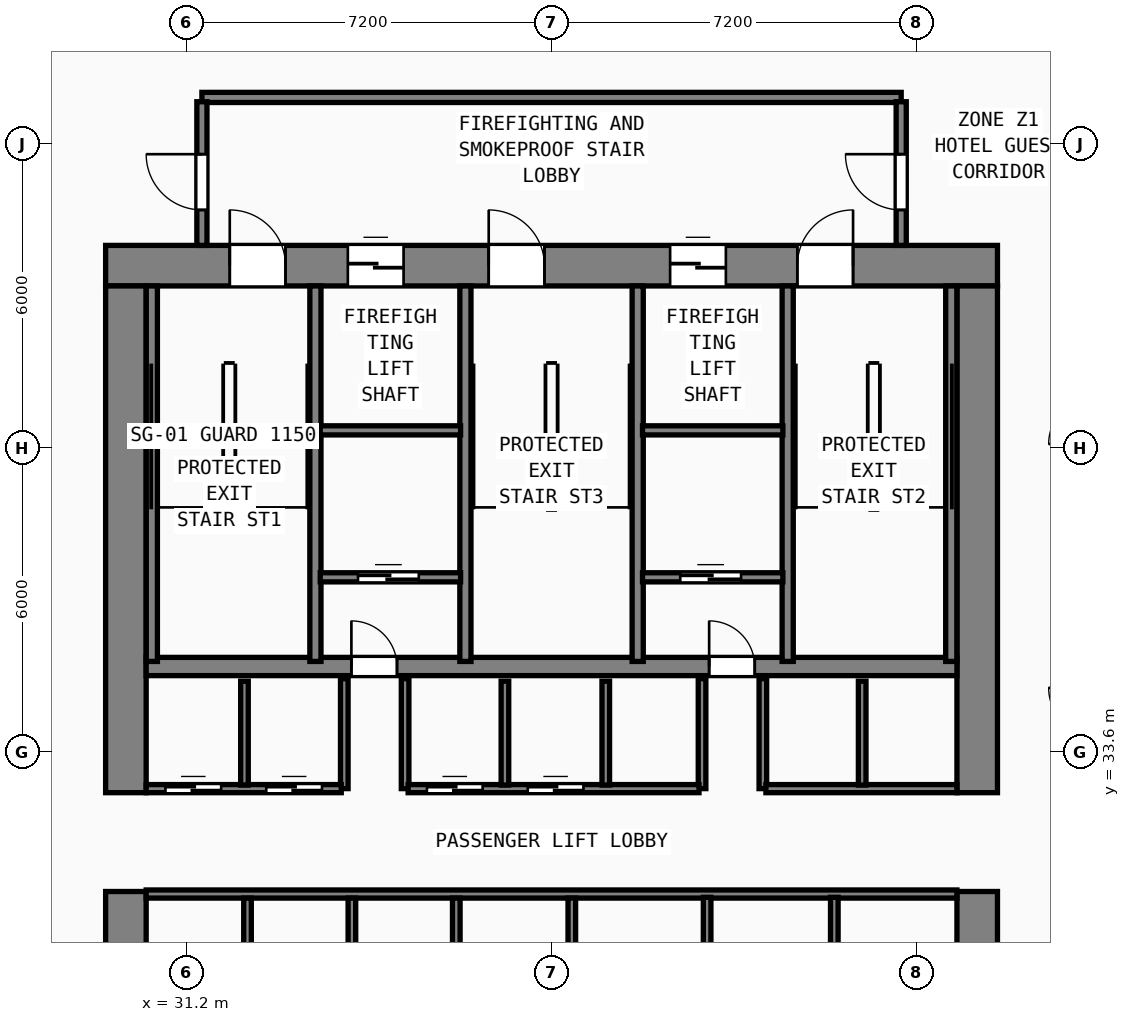
"""IFC4 building model, lengths in metres.
Left out: names, types, materials, properties, quantities, classifications, styles, units other than length and angle.
Written with IfcOpenShell. Run it as: python <this file> out.ifc"""

import sys

from ifc_helpers import new_model, si_unit, direction, frame, frame_2d, origin, place, context, subcontext, project, spatial, rectangle, extrude, element, fill, save


model = new_model("IFC4")
c1 = context("Model", 3, precision=1e-05, world=origin(), true_north=direction((0.0, 1.0)))
c2 = subcontext(c1, "Body", "Model", "MODEL_VIEW")
j1 = project(units=[si_unit("LENGTHUNIT", "METRE"), si_unit("PLANEANGLEUNIT", "RADIAN")], contexts=[c1])
p1 = place(None, origin())
s1 = spatial("IfcSite", under=j1, at=p1, CompositionType="ELEMENT")
p2 = place(p1, origin())
s2 = spatial("IfcBuilding", under=s1, at=p2, CompositionType="ELEMENT")
p3 = place(p2, frame((0.0, 0.0, 24.0)))
s3 = spatial("IfcBuildingStorey", under=s2, at=p3, CompositionType="ELEMENT", Elevation=24.0)
p4 = place(p3, frame((29.6, 43.2, 0.0), z_axis=(0.0, 0.0, 1.0), x_axis=(1.0, 0.0, 0.0)))
e1 = element("IfcWall", 1, at=p4, inside=s3, PredefinedType="SHEAR", context=c2, shape_type="SweptSolid", body=[
    extrude(rectangle(XDim=17.6, YDim=0.8, at=frame_2d((8.8, 0.0))), origin(), (0.0, 0.0, 1.0), 3.6),
])
p5 = place(p4, frame((2.45, 0.0, 0.0)))
e2 = element("IfcOpeningElement", 2, at=p5, cuts=e1, PredefinedType="OPENING", context=c2, shape_type="SweptSolid", body=[
    extrude(rectangle(XDim=1.1, YDim=2.15, at=frame_2d((0.55, 1.075))), frame((0.0, 0.41, 0.0), z_axis=(0.0, -1.0, 0.0), x_axis=(1.0, 0.0, 0.0)), (0.0, 0.0, 1.0), 0.82),
])
p6 = place(p4, frame((7.56, 0.0, 0.0)))
e3 = element("IfcOpeningElement", 3, at=p6, cuts=e1, PredefinedType="OPENING", context=c2, shape_type="SweptSolid", body=[
    extrude(rectangle(XDim=1.1, YDim=2.15, at=frame_2d((0.55, 1.075))), frame((0.0, 0.41, 0.0), z_axis=(0.0, -1.0, 0.0), x_axis=(1.0, 0.0, 0.0)), (0.0, 0.0, 1.0), 0.82),
])
p7 = place(p4, frame((13.65, 0.0, 0.0)))
e4 = element("IfcOpeningElement", 4, at=p7, cuts=e1, PredefinedType="OPENING", context=c2, shape_type="SweptSolid", body=[
    extrude(rectangle(XDim=1.1, YDim=2.15, at=frame_2d((0.55, 1.075))), frame((0.0, 0.41, 0.0), z_axis=(0.0, -1.0, 0.0), x_axis=(1.0, 0.0, 0.0)), (0.0, 0.0, 1.0), 0.82),
])
p8 = place(p4, frame((4.78, 0.0, 0.0)))
e5 = element("IfcOpeningElement", 5, at=p8, cuts=e1, PredefinedType="OPENING", context=c2, shape_type="SweptSolid", body=[
    extrude(rectangle(XDim=1.1, YDim=2.2, at=frame_2d((0.55, 1.1))), frame((0.0, 0.41, 0.0), z_axis=(0.0, -1.0, 0.0), x_axis=(1.0, 0.0, 0.0)), (0.0, 0.0, 1.0), 0.82),
])
p9 = place(p4, frame((11.14, 0.0, 0.0)))
e6 = element("IfcOpeningElement", 6, at=p9, cuts=e1, PredefinedType="OPENING", context=c2, shape_type="SweptSolid", body=[
    extrude(rectangle(XDim=1.1, YDim=2.2, at=frame_2d((0.55, 1.1))), frame((0.0, 0.41, 0.0), z_axis=(0.0, -1.0, 0.0), x_axis=(1.0, 0.0, 0.0)), (0.0, 0.0, 1.0), 0.82),
])
p10 = place(p3, frame((30.0, 26.8, 0.0), z_axis=(0.0, 0.0, 1.0), x_axis=(0.0, 1.0, 0.0)))
e7 = element("IfcWall", 7, at=p10, inside=s3, PredefinedType="SHEAR", context=c2, shape_type="SweptSolid", body=[
    extrude(rectangle(XDim=4.05, YDim=0.8, at=frame_2d((2.025, 0.0))), origin(), (0.0, 0.0, 1.0), 3.6),
])
p11 = place(p3, frame((30.0, 32.8, 0.0), z_axis=(0.0, 0.0, 1.0), x_axis=(0.0, 1.0, 0.0)))
e8 = element("IfcWall", 8, at=p11, inside=s3, PredefinedType="SHEAR", context=c2, shape_type="SweptSolid", body=[
    extrude(rectangle(XDim=10.0, YDim=0.8, at=frame_2d((5.0, 0.0))), origin(), (0.0, 0.0, 1.0), 3.6),
])
p12 = place(p3, frame((46.8, 26.8, 0.0), z_axis=(0.0, 0.0, 1.0), x_axis=(0.0, 1.0, 0.0)))
e9 = element("IfcWall", 9, at=p12, inside=s3, PredefinedType="SHEAR", context=c2, shape_type="SweptSolid", body=[
    extrude(rectangle(XDim=4.05, YDim=0.8, at=frame_2d((2.025, 0.0))), origin(), (0.0, 0.0, 1.0), 3.6),
])
p13 = place(p3, frame((46.8, 32.8, 0.0), z_axis=(0.0, 0.0, 1.0), x_axis=(0.0, 1.0, 0.0)))
e10 = element("IfcWall", 10, at=p13, inside=s3, PredefinedType="SHEAR", context=c2, shape_type="SweptSolid", body=[
    extrude(rectangle(XDim=10.0, YDim=0.8, at=frame_2d((5.0, 0.0))), origin(), (0.0, 0.0, 1.0), 3.6),
])
p14 = place(p3, frame((30.4, 35.29, 0.0), z_axis=(0.0, 0.0, 1.0), x_axis=(1.0, 0.0, 0.0)))
e11 = element("IfcWall", 11, at=p14, inside=s3, PredefinedType="SHEAR", context=c2, shape_type="SweptSolid", body=[
    extrude(rectangle(XDim=16.0, YDim=0.36, at=frame_2d((8.0, 0.0))), origin(), (0.0, 0.0, 1.0), 3.6),
])
p15 = place(p14, frame((4.95, 0.0, 0.0), z_axis=(0.0, 0.0, 1.0), x_axis=(-1.0, 0.0, 0.0)))
e12 = element("IfcOpeningElement", 12, at=p15, cuts=e11, PredefinedType="OPENING", context=c2, shape_type="SweptSolid", body=[
    extrude(rectangle(XDim=0.9, YDim=2.1, at=frame_2d((0.45, 1.05))), frame((0.0, 0.19, 0.0), z_axis=(0.0, -1.0, 0.0), x_axis=(1.0, 0.0, 0.0)), (0.0, 0.0, 1.0), 0.38),
])
p16 = place(p14, frame((12.01, 0.0, 0.0), z_axis=(0.0, 0.0, 1.0), x_axis=(-1.0, 0.0, 0.0)))
e13 = element("IfcOpeningElement", 13, at=p16, cuts=e11, PredefinedType="OPENING", context=c2, shape_type="SweptSolid", body=[
    extrude(rectangle(XDim=0.9, YDim=2.1, at=frame_2d((0.45, 1.05))), frame((0.0, 0.19, 0.0), z_axis=(0.0, -1.0, 0.0), x_axis=(1.0, 0.0, 0.0)), (0.0, 0.0, 1.0), 0.38),
])
for number, where, z_axis, x_axis in (
    (14, (30.512, 35.39, 0.0), (0.0, 0.0, 1.0), (0.0, 1.0, 0.0)),
    (15, (33.74, 35.39, 0.0), (0.0, 0.0, 1.0), (0.0, 1.0, 0.0)),
    (16, (36.7, 35.39, 0.0), (0.0, 0.0, 1.0), (0.0, 1.0, 0.0)),
    (17, (40.1, 35.39, 0.0), (0.0, 0.0, 1.0), (0.0, 1.0, 0.0)),
    (18, (43.06, 35.39, 0.0), (0.0, 0.0, 1.0), (0.0, 1.0, 0.0)),
    (19, (46.288, 35.39, 0.0), (0.0, 0.0, 1.0), (0.0, 1.0, 0.0)),
):
    element("IfcWall", number, at=place(p3, frame(where, z_axis=z_axis, x_axis=x_axis)), inside=s3, PredefinedType="SHEAR", context=c2, shape_type="SweptSolid", body=[
        extrude(rectangle(XDim=7.41, YDim=0.22, at=frame_2d((3.705, 0.0))), origin(), (0.0, 0.0, 1.0), 3.6),
    ])
p17 = place(p3, frame((31.5, 46.52, 0.0), z_axis=(0.0, 0.0, 1.0), x_axis=(1.0, 0.0, 0.0)))
e20 = element("IfcWall", 20, at=p17, inside=s3, PredefinedType="SOLIDWALL", context=c2, shape_type="SweptSolid", body=[
    extrude(rectangle(XDim=13.8, YDim=0.2, at=frame_2d((6.9, 0.0))), origin(), (0.0, 0.0, 1.0), 3.6),
])
p18 = place(p3, frame((31.5, 43.6, 0.0), z_axis=(0.0, 0.0, 1.0), x_axis=(0.0, 1.0, 0.0)))
e21 = element("IfcWall", 21, at=p18, inside=s3, PredefinedType="SOLIDWALL", context=c2, shape_type="SweptSolid", body=[
    extrude(rectangle(XDim=2.835, YDim=0.2, at=frame_2d((1.417, 0.0))), origin(), (0.0, 0.0, 1.0), 3.6),
])
p19 = place(p18, frame((1.8, 0.0, 0.0), z_axis=(0.0, 0.0, 1.0), x_axis=(-1.0, 0.0, 0.0)))
e22 = element("IfcOpeningElement", 22, at=p19, cuts=e21, PredefinedType="OPENING", context=c2, shape_type="SweptSolid", body=[
    extrude(rectangle(XDim=1.1, YDim=2.15, at=frame_2d((0.55, 1.075))), frame((0.0, 0.11, 0.0), z_axis=(0.0, -1.0, 0.0), x_axis=(1.0, 0.0, 0.0)), (0.0, 0.0, 1.0), 0.22),
])
p20 = place(p3, frame((45.3, 43.6, 0.0), z_axis=(0.0, 0.0, 1.0), x_axis=(0.0, 1.0, 0.0)))
e23 = element("IfcWall", 23, at=p20, inside=s3, PredefinedType="SOLIDWALL", context=c2, shape_type="SweptSolid", body=[
    extrude(rectangle(XDim=2.835, YDim=0.2, at=frame_2d((1.417, 0.0))), origin(), (0.0, 0.0, 1.0), 3.6),
])
p21 = place(p20, frame((0.7, 0.0, 0.0)))
e24 = element("IfcOpeningElement", 24, at=p21, cuts=e23, PredefinedType="OPENING", context=c2, shape_type="SweptSolid", body=[
    extrude(rectangle(XDim=1.1, YDim=2.15, at=frame_2d((0.55, 1.075))), frame((0.0, 0.11, 0.0), z_axis=(0.0, -1.0, 0.0), x_axis=(1.0, 0.0, 0.0)), (0.0, 0.0, 1.0), 0.22),
])
for number, where, z_axis, x_axis in (
    (25, (33.835, 39.95, 0.0), (0.0, 0.0, 1.0), (1.0, 0.0, 0.0)),
    (26, (40.195, 39.95, 0.0), (0.0, 0.0, 1.0), (1.0, 0.0, 0.0)),
):
    element("IfcWall", number, at=place(p3, frame(where, z_axis=z_axis, x_axis=x_axis)), inside=s3, PredefinedType="SOLIDWALL", context=c2, shape_type="SweptSolid", body=[
        extrude(rectangle(XDim=2.77, YDim=0.18, at=frame_2d((1.385, 0.0))), origin(), (0.0, 0.0, 1.0), 3.6),
    ])
p22 = place(p3, frame((33.835, 37.05, 0.0), z_axis=(0.0, 0.0, 1.0), x_axis=(1.0, 0.0, 0.0)))
e27 = element("IfcWall", 27, at=p22, inside=s3, PredefinedType="SOLIDWALL", context=c2, shape_type="SweptSolid", body=[
    extrude(rectangle(XDim=2.77, YDim=0.18, at=frame_2d((1.385, 0.0))), origin(), (0.0, 0.0, 1.0), 3.6),
])
p23 = place(p22, frame((1.945, 0.0, 0.0), z_axis=(0.0, 0.0, 1.0), x_axis=(-1.0, 0.0, 0.0)))
e28 = element("IfcOpeningElement", 28, at=p23, cuts=e27, PredefinedType="OPENING", context=c2, shape_type="SweptSolid", body=[
    extrude(rectangle(XDim=1.2, YDim=2.2, at=frame_2d((0.6, 1.1))), frame((0.0, 0.1, 0.0), z_axis=(0.0, -1.0, 0.0), x_axis=(1.0, 0.0, 0.0)), (0.0, 0.0, 1.0), 0.2),
])
for number, where, z_axis, x_axis in (
    (29, (34.31, 32.88, 0.0), (0.0, 0.0, 1.0), (0.0, 1.0, 0.0)),
    (30, (35.51, 32.88, 0.0), (0.0, 0.0, 1.0), (0.0, 1.0, 0.0)),
):
    element("IfcWall", number, at=place(p3, frame(where, z_axis=z_axis, x_axis=x_axis)), inside=s3, PredefinedType="SOLIDWALL", context=c2, shape_type="SweptSolid", body=[
        extrude(rectangle(XDim=2.17, YDim=0.15, at=frame_2d((1.085, 0.0))), origin(), (0.0, 0.0, 1.0), 3.6),
    ])
p24 = place(p3, frame((40.195, 37.05, 0.0), z_axis=(0.0, 0.0, 1.0), x_axis=(1.0, 0.0, 0.0)))
e31 = element("IfcWall", 31, at=p24, inside=s3, PredefinedType="SOLIDWALL", context=c2, shape_type="SweptSolid", body=[
    extrude(rectangle(XDim=2.77, YDim=0.18, at=frame_2d((1.385, 0.0))), origin(), (0.0, 0.0, 1.0), 3.6),
])
p25 = place(p24, frame((1.945, 0.0, 0.0), z_axis=(0.0, 0.0, 1.0), x_axis=(-1.0, 0.0, 0.0)))
e32 = element("IfcOpeningElement", 32, at=p25, cuts=e31, PredefinedType="OPENING", context=c2, shape_type="SweptSolid", body=[
    extrude(rectangle(XDim=1.2, YDim=2.2, at=frame_2d((0.6, 1.1))), frame((0.0, 0.1, 0.0), z_axis=(0.0, -1.0, 0.0), x_axis=(1.0, 0.0, 0.0)), (0.0, 0.0, 1.0), 0.2),
])
for number, where, z_axis, x_axis in (
    (33, (41.37, 32.88, 0.0), (0.0, 0.0, 1.0), (0.0, 1.0, 0.0)),
    (34, (42.57, 32.88, 0.0), (0.0, 0.0, 1.0), (0.0, 1.0, 0.0)),
):
    element("IfcWall", number, at=place(p3, frame(where, z_axis=z_axis, x_axis=x_axis)), inside=s3, PredefinedType="SOLIDWALL", context=c2, shape_type="SweptSolid", body=[
        extrude(rectangle(XDim=2.17, YDim=0.15, at=frame_2d((1.085, 0.0))), origin(), (0.0, 0.0, 1.0), 3.6),
    ])
p26 = place(p3, frame((30.4, 32.88, 0.0), z_axis=(0.0, 0.0, 1.0), x_axis=(1.0, 0.0, 0.0)))
e35 = element("IfcWall", 35, at=p26, inside=s3, PredefinedType="SOLIDWALL", context=c2, shape_type="SweptSolid", body=[
    extrude(rectangle(XDim=3.85, YDim=0.16, at=frame_2d((1.925, 0.0))), origin(), (0.0, 0.0, 1.0), 3.6),
])
p27 = place(p26, frame((1.48, 0.0, 0.0), z_axis=(0.0, 0.0, 1.0), x_axis=(-1.0, 0.0, 0.0)))
e36 = element("IfcOpeningElement", 36, at=p27, cuts=e35, PredefinedType="OPENING", context=c2, shape_type="SweptSolid", body=[
    extrude(rectangle(XDim=1.1, YDim=2.2, at=frame_2d((0.55, 1.1))), frame((0.0, 0.09, 0.0), z_axis=(0.0, -1.0, 0.0), x_axis=(1.0, 0.0, 0.0)), (0.0, 0.0, 1.0), 0.18),
])
p28 = place(p26, frame((3.47, 0.0, 0.0), z_axis=(0.0, 0.0, 1.0), x_axis=(-1.0, 0.0, 0.0)))
e37 = element("IfcOpeningElement", 37, at=p28, cuts=e35, PredefinedType="OPENING", context=c2, shape_type="SweptSolid", body=[
    extrude(rectangle(XDim=1.1, YDim=2.2, at=frame_2d((0.55, 1.1))), frame((0.0, 0.09, 0.0), z_axis=(0.0, -1.0, 0.0), x_axis=(1.0, 0.0, 0.0)), (0.0, 0.0, 1.0), 0.18),
])
p29 = place(p3, frame((35.57, 32.88, 0.0), z_axis=(0.0, 0.0, 1.0), x_axis=(1.0, 0.0, 0.0)))
e38 = element("IfcWall", 38, at=p29, inside=s3, PredefinedType="SOLIDWALL", context=c2, shape_type="SweptSolid", body=[
    extrude(rectangle(XDim=5.74, YDim=0.16, at=frame_2d((2.87, 0.0))), origin(), (0.0, 0.0, 1.0), 3.6),
])
p30 = place(p29, frame((1.47, 0.0, 0.0), z_axis=(0.0, 0.0, 1.0), x_axis=(-1.0, 0.0, 0.0)))
e39 = element("IfcOpeningElement", 39, at=p30, cuts=e38, PredefinedType="OPENING", context=c2, shape_type="SweptSolid", body=[
    extrude(rectangle(XDim=1.1, YDim=2.2, at=frame_2d((0.55, 1.1))), frame((0.0, 0.09, 0.0), z_axis=(0.0, -1.0, 0.0), x_axis=(1.0, 0.0, 0.0)), (0.0, 0.0, 1.0), 0.18),
])
p31 = place(p29, frame((3.46, 0.0, 0.0), z_axis=(0.0, 0.0, 1.0), x_axis=(-1.0, 0.0, 0.0)))
e40 = element("IfcOpeningElement", 40, at=p31, cuts=e38, PredefinedType="OPENING", context=c2, shape_type="SweptSolid", body=[
    extrude(rectangle(XDim=1.1, YDim=2.2, at=frame_2d((0.55, 1.1))), frame((0.0, 0.09, 0.0), z_axis=(0.0, -1.0, 0.0), x_axis=(1.0, 0.0, 0.0)), (0.0, 0.0, 1.0), 0.18),
])
p32 = place(p3, frame((42.63, 32.88, 0.0), z_axis=(0.0, 0.0, 1.0), x_axis=(1.0, 0.0, 0.0)))
e41 = element("IfcWall", 41, at=p32, inside=s3, PredefinedType="SOLIDWALL", context=c2, shape_type="SweptSolid", body=[
    extrude(rectangle(XDim=3.77, YDim=0.16, at=frame_2d((1.885, 0.0))), origin(), (0.0, 0.0, 1.0), 3.6),
])
for number, where, z_axis, x_axis in (
    (42, (32.34, 32.95, 0.0), (0.0, 0.0, 1.0), (0.0, 1.0, 0.0)),
    (43, (37.48, 32.95, 0.0), (0.0, 0.0, 1.0), (0.0, 1.0, 0.0)),
    (44, (39.47, 32.95, 0.0), (0.0, 0.0, 1.0), (0.0, 1.0, 0.0)),
    (45, (44.53, 32.95, 0.0), (0.0, 0.0, 1.0), (0.0, 1.0, 0.0)),
):
    element("IfcWall", number, at=place(p3, frame(where, z_axis=z_axis, x_axis=x_axis)), inside=s3, PredefinedType="SOLIDWALL", context=c2, shape_type="SweptSolid", body=[
        extrude(rectangle(XDim=2.05, YDim=0.15, at=frame_2d((1.025, 0.0))), origin(), (0.0, 0.0, 1.0), 3.6),
    ])
p33 = place(p3, frame((30.4, 30.8, 0.0), z_axis=(0.0, 0.0, 1.0), x_axis=(1.0, 0.0, 0.0)))
e46 = element("IfcWall", 46, at=p33, inside=s3, PredefinedType="SOLIDWALL", context=c2, shape_type="SweptSolid", body=[
    extrude(rectangle(XDim=16.0, YDim=0.16, at=frame_2d((8.0, 0.0))), origin(), (0.0, 0.0, 1.0), 3.6),
])
for number, where, z_axis, x_axis in (
    (47, (32.4, 28.735, 0.0), (0.0, 0.0, 1.0), (0.0, 1.0, 0.0)),
    (48, (34.46, 28.735, 0.0), (0.0, 0.0, 1.0), (0.0, 1.0, 0.0)),
    (49, (36.52, 28.735, 0.0), (0.0, 0.0, 1.0), (0.0, 1.0, 0.0)),
    (50, (38.8, 28.735, 0.0), (0.0, 0.0, 1.0), (0.0, 1.0, 0.0)),
):
    element("IfcWall", number, at=place(p3, frame(where, z_axis=z_axis, x_axis=x_axis)), inside=s3, PredefinedType="SOLIDWALL", context=c2, shape_type="SweptSolid", body=[
        extrude(rectangle(XDim=1.985, YDim=0.15, at=frame_2d((0.992, 0.0))), origin(), (0.0, 0.0, 1.0), 3.6),
    ])
for number, where, z_axis, x_axis in (
    (51, (41.47, 28.75, 0.0), (0.0, 0.0, 1.0), (0.0, 1.0, 0.0)),
    (52, (43.98, 28.75, 0.0), (0.0, 0.0, 1.0), (0.0, 1.0, 0.0)),
):
    element("IfcWall", number, at=place(p3, frame(where, z_axis=z_axis, x_axis=x_axis)), inside=s3, PredefinedType="SOLIDWALL", context=c2, shape_type="SweptSolid", body=[
        extrude(rectangle(XDim=1.985, YDim=0.15, at=frame_2d((0.993, 0.0))), origin(), (0.0, 0.0, 1.0), 3.6),
    ])
p34 = place(p5, origin())
e53 = element("IfcDoor", 53, at=p34, inside=s3, OperationType="SINGLE_SWING_LEFT", PredefinedType="DOOR", context=c2, shape_type="SweptSolid", body=[
    extrude(rectangle(XDim=1.1, YDim=2.15, at=frame_2d((0.55, 1.075))), frame((0.0, 0.185, 0.0), z_axis=(0.0, -1.0, 0.0), x_axis=(1.0, 0.0, 0.0)), (0.0, 0.0, 1.0), 0.05),
])
fill(e2, e53)
p35 = place(p6, origin())
e54 = element("IfcDoor", 54, at=p35, inside=s3, OperationType="SINGLE_SWING_LEFT", PredefinedType="DOOR", context=c2, shape_type="SweptSolid", body=[
    extrude(rectangle(XDim=1.1, YDim=2.15, at=frame_2d((0.55, 1.075))), frame((0.0, 0.185, 0.0), z_axis=(0.0, -1.0, 0.0), x_axis=(1.0, 0.0, 0.0)), (0.0, 0.0, 1.0), 0.05),
])
fill(e3, e54)
p36 = place(p7, origin())
e55 = element("IfcDoor", 55, at=p36, inside=s3, OperationType="SINGLE_SWING_RIGHT", PredefinedType="DOOR", context=c2, shape_type="SweptSolid", body=[
    extrude(rectangle(XDim=1.1, YDim=2.15, at=frame_2d((0.55, 1.075))), frame((0.0, 0.185, 0.0), z_axis=(0.0, -1.0, 0.0), x_axis=(1.0, 0.0, 0.0)), (0.0, 0.0, 1.0), 0.05),
])
fill(e4, e55)
p37 = place(p19, origin())
e56 = element("IfcDoor", 56, at=p37, inside=s3, OperationType="SINGLE_SWING_LEFT", PredefinedType="DOOR", context=c2, shape_type="SweptSolid", body=[
    extrude(rectangle(XDim=1.1, YDim=2.15, at=frame_2d((0.55, 1.075))), frame((0.0, 0.025, 0.0), z_axis=(0.0, -1.0, 0.0), x_axis=(1.0, 0.0, 0.0)), (0.0, 0.0, 1.0), 0.05),
])
fill(e22, e56)
p38 = place(p21, origin())
e57 = element("IfcDoor", 57, at=p38, inside=s3, OperationType="SINGLE_SWING_RIGHT", PredefinedType="DOOR", context=c2, shape_type="SweptSolid", body=[
    extrude(rectangle(XDim=1.1, YDim=2.15, at=frame_2d((0.55, 1.075))), frame((0.0, 0.025, 0.0), z_axis=(0.0, -1.0, 0.0), x_axis=(1.0, 0.0, 0.0)), (0.0, 0.0, 1.0), 0.05),
])
fill(e24, e57)
p39 = place(p8, origin())
e58 = element("IfcDoor", 58, at=p39, inside=s3, OperationType="SLIDING_TO_LEFT", PredefinedType="DOOR", context=c2, shape_type="SweptSolid", body=[
    extrude(rectangle(XDim=1.1, YDim=2.2, at=frame_2d((0.55, 1.1))), frame((0.0, 0.185, 0.0), z_axis=(0.0, -1.0, 0.0), x_axis=(1.0, 0.0, 0.0)), (0.0, 0.0, 1.0), 0.05),
])
fill(e5, e58)
p40 = place(p9, origin())
e59 = element("IfcDoor", 59, at=p40, inside=s3, OperationType="SLIDING_TO_LEFT", PredefinedType="DOOR", context=c2, shape_type="SweptSolid", body=[
    extrude(rectangle(XDim=1.1, YDim=2.2, at=frame_2d((0.55, 1.1))), frame((0.0, 0.185, 0.0), z_axis=(0.0, -1.0, 0.0), x_axis=(1.0, 0.0, 0.0)), (0.0, 0.0, 1.0), 0.05),
])
fill(e6, e59)
p41 = place(p23, origin())
e60 = element("IfcDoor", 60, at=p41, inside=s3, OperationType="SLIDING_TO_RIGHT", PredefinedType="DOOR", context=c2, shape_type="SweptSolid", body=[
    extrude(rectangle(XDim=1.2, YDim=2.2, at=frame_2d((0.6, 1.1))), frame((0.0, 0.025, 0.0), z_axis=(0.0, -1.0, 0.0), x_axis=(1.0, 0.0, 0.0)), (0.0, 0.0, 1.0), 0.05),
])
fill(e28, e60)
p42 = place(p15, origin())
e61 = element("IfcDoor", 61, at=p42, inside=s3, OperationType="SINGLE_SWING_RIGHT", PredefinedType="DOOR", context=c2, shape_type="SweptSolid", body=[
    extrude(rectangle(XDim=0.9, YDim=2.1, at=frame_2d((0.45, 1.05))), frame((0.0, 0.025, 0.0), z_axis=(0.0, -1.0, 0.0), x_axis=(1.0, 0.0, 0.0)), (0.0, 0.0, 1.0), 0.05),
])
fill(e12, e61)
p43 = place(p25, origin())
e62 = element("IfcDoor", 62, at=p43, inside=s3, OperationType="SLIDING_TO_RIGHT", PredefinedType="DOOR", context=c2, shape_type="SweptSolid", body=[
    extrude(rectangle(XDim=1.2, YDim=2.2, at=frame_2d((0.6, 1.1))), frame((0.0, 0.025, 0.0), z_axis=(0.0, -1.0, 0.0), x_axis=(1.0, 0.0, 0.0)), (0.0, 0.0, 1.0), 0.05),
])
fill(e32, e62)
p44 = place(p16, origin())
e63 = element("IfcDoor", 63, at=p44, inside=s3, OperationType="SINGLE_SWING_RIGHT", PredefinedType="DOOR", context=c2, shape_type="SweptSolid", body=[
    extrude(rectangle(XDim=0.9, YDim=2.1, at=frame_2d((0.45, 1.05))), frame((0.0, 0.025, 0.0), z_axis=(0.0, -1.0, 0.0), x_axis=(1.0, 0.0, 0.0)), (0.0, 0.0, 1.0), 0.05),
])
fill(e13, e63)
p45 = place(p27, origin())
e64 = element("IfcDoor", 64, at=p45, inside=s3, OperationType="SLIDING_TO_LEFT", PredefinedType="DOOR", context=c2, shape_type="SweptSolid", body=[
    extrude(rectangle(XDim=1.1, YDim=2.2, at=frame_2d((0.55, 1.1))), frame((0.0, 0.025, 0.0), z_axis=(0.0, -1.0, 0.0), x_axis=(1.0, 0.0, 0.0)), (0.0, 0.0, 1.0), 0.05),
])
fill(e36, e64)
p46 = place(p28, origin())
e65 = element("IfcDoor", 65, at=p46, inside=s3, OperationType="SLIDING_TO_LEFT", PredefinedType="DOOR", context=c2, shape_type="SweptSolid", body=[
    extrude(rectangle(XDim=1.1, YDim=2.2, at=frame_2d((0.55, 1.1))), frame((0.0, 0.025, 0.0), z_axis=(0.0, -1.0, 0.0), x_axis=(1.0, 0.0, 0.0)), (0.0, 0.0, 1.0), 0.05),
])
fill(e37, e65)
p47 = place(p30, origin())
e66 = element("IfcDoor", 66, at=p47, inside=s3, OperationType="SLIDING_TO_LEFT", PredefinedType="DOOR", context=c2, shape_type="SweptSolid", body=[
    extrude(rectangle(XDim=1.1, YDim=2.2, at=frame_2d((0.55, 1.1))), frame((0.0, 0.025, 0.0), z_axis=(0.0, -1.0, 0.0), x_axis=(1.0, 0.0, 0.0)), (0.0, 0.0, 1.0), 0.05),
])
fill(e39, e66)
p48 = place(p31, origin())
e67 = element("IfcDoor", 67, at=p48, inside=s3, OperationType="SLIDING_TO_LEFT", PredefinedType="DOOR", context=c2, shape_type="SweptSolid", body=[
    extrude(rectangle(XDim=1.1, YDim=2.2, at=frame_2d((0.55, 1.1))), frame((0.0, 0.025, 0.0), z_axis=(0.0, -1.0, 0.0), x_axis=(1.0, 0.0, 0.0)), (0.0, 0.0, 1.0), 0.05),
])
fill(e40, e67)
save(model, sys.argv[1])
